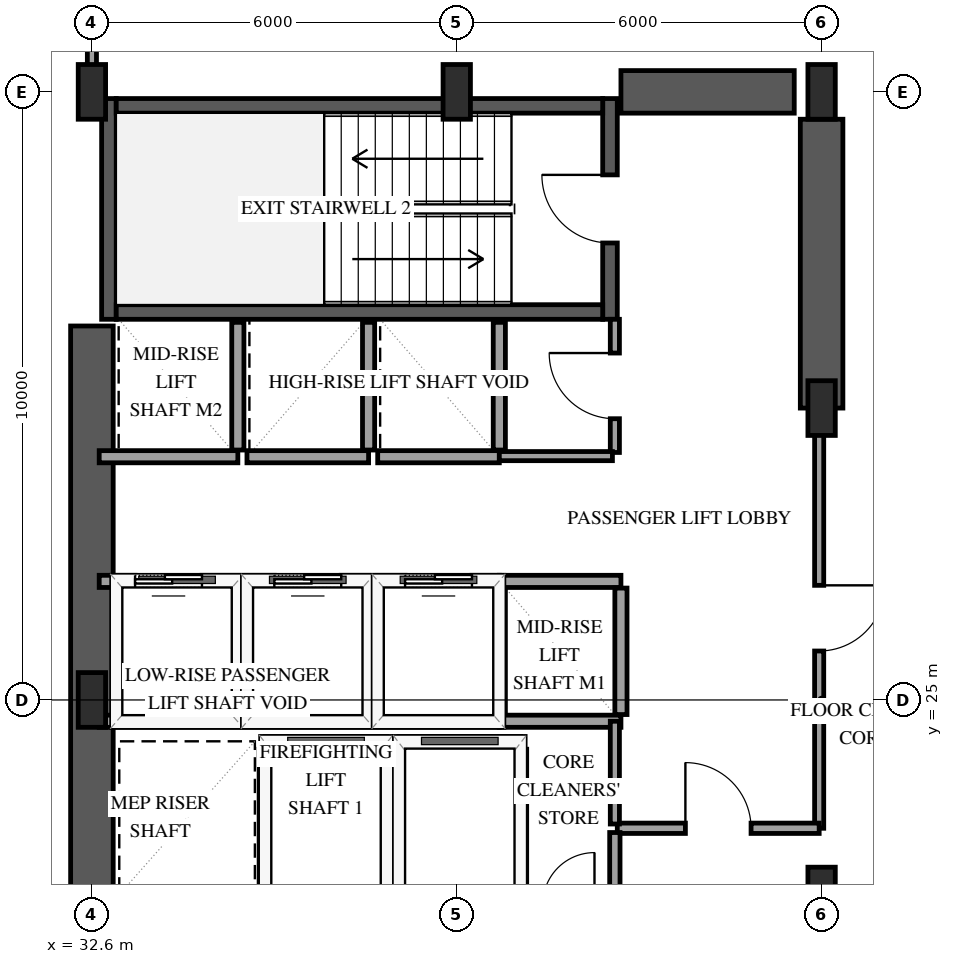
"""IFC4 building model, lengths in metres.
Left out: names, types, materials, properties, quantities, classifications, styles, units other than length and angle.
Written with IfcOpenShell. Run it as: python <this file> out.ifc"""

import sys

from ifc_helpers import new_model, si_unit, direction, frame, frame_2d, origin, origin_2d, place, context, subcontext, project, spatial, rectangle, extrude, element, fill, save


model = new_model("IFC4")
c1 = context("Model", 3, precision=1e-05, world=origin(), true_north=direction((0.0, 1.0)))
c2 = subcontext(c1, "Body", "Model", "MODEL_VIEW")
j1 = project(units=[si_unit("LENGTHUNIT", "METRE"), si_unit("PLANEANGLEUNIT", "RADIAN")], contexts=[c1])
p1 = place(None, origin())
s1 = spatial("IfcSite", under=j1, at=p1, CompositionType="ELEMENT")
p2 = place(p1, origin())
s2 = spatial("IfcBuilding", under=s1, at=p2, CompositionType="ELEMENT")
p3 = place(p2, frame((0.0, 0.0, 58.6)))
s3 = spatial("IfcBuildingStorey", under=s2, at=p3, CompositionType="ELEMENT", Elevation=58.6)
p4 = place(p3, frame((32.88, 31.26, 0.0), z_axis=(0.0, 0.0, 1.0), x_axis=(0.0, 1.0, 0.0)))
e1 = element("IfcWall", 1, at=p4, inside=s3, PredefinedType="SHEAR", context=c2, shape_type="SweptSolid", body=[
    extrude(rectangle(XDim=3.63, YDim=0.24, at=frame_2d((1.815, 0.0))), origin(), (0.0, 0.0, 1.0), 4.0),
])
p5 = place(p3, frame((41.12, 31.26, 0.0), z_axis=(0.0, 0.0, 1.0), x_axis=(0.0, 1.0, 0.0)))
e2 = element("IfcWall", 2, at=p5, inside=s3, PredefinedType="SHEAR", context=c2, shape_type="SweptSolid", body=[
    extrude(rectangle(XDim=3.63, YDim=0.24, at=frame_2d((1.815, 0.0))), origin(), (0.0, 0.0, 1.0), 4.0),
])
p6 = place(p5, frame((1.255, 0.0, 0.0)))
e3 = element("IfcOpeningElement", 3, at=p6, cuts=e2, PredefinedType="OPENING", context=c2, shape_type="SweptSolid", body=[
    extrude(rectangle(XDim=1.12, YDim=2.15, at=frame_2d((0.56, 1.075))), frame((0.0, 0.13, 0.0), z_axis=(0.0, -1.0, 0.0), x_axis=(1.0, 0.0, 0.0)), (0.0, 0.0, 1.0), 0.26),
])
for number, where, z_axis, x_axis in (
    (4, (33.0, 31.38, 0.0), (0.0, 0.0, 1.0), (1.0, 0.0, 0.0)),
    (5, (33.0, 34.77, 0.0), (0.0, 0.0, 1.0), (1.0, 0.0, 0.0)),
):
    element("IfcWall", number, at=place(p3, frame(where, z_axis=z_axis, x_axis=x_axis)), inside=s3, PredefinedType="SHEAR", context=c2, shape_type="SweptSolid", body=[
        extrude(rectangle(XDim=8.0, YDim=0.24, at=frame_2d((4.0, 0.0))), origin(), (0.0, 0.0, 1.0), 4.0),
    ])
p7 = place(p3, frame((32.6, 18.85, 0.0), z_axis=(0.0, 0.0, 1.0), x_axis=(0.0, 1.0, 0.0)))
e6 = element("IfcWall", 6, at=p7, inside=s3, PredefinedType="SHEAR", context=c2, shape_type="SweptSolid", body=[
    extrude(rectangle(XDim=12.3, YDim=0.7, at=frame_2d((6.15, 0.0))), origin(), (0.0, 0.0, 1.0), 4.0),
])
p8 = place(p3, frame((41.3, 35.0, 0.0), z_axis=(0.0, 0.0, 1.0), x_axis=(1.0, 0.0, 0.0)))
e7 = element("IfcWall", 7, at=p8, inside=s3, PredefinedType="SHEAR", context=c2, shape_type="SweptSolid", body=[
    extrude(rectangle(XDim=2.85, YDim=0.7, at=frame_2d((1.425, 0.0))), origin(), (0.0, 0.0, 1.0), 4.0),
])
p9 = place(p3, frame((44.6, 29.8, 0.0), z_axis=(0.0, 0.0, 1.0), x_axis=(0.0, 1.0, 0.0)))
e8 = element("IfcWall", 8, at=p9, inside=s3, PredefinedType="SHEAR", context=c2, shape_type="SweptSolid", body=[
    extrude(rectangle(XDim=4.75, YDim=0.7, at=frame_2d((2.375, 0.0))), origin(), (0.0, 0.0, 1.0), 4.0),
])
for number, where, z_axis, x_axis in (
    (9, (32.6, 25.0, 0.0), (0.0, 0.0, 1.0), (1.0, 0.0, 0.0)),
    (10, (32.6, 35.0, 0.0), (0.0, 0.0, 1.0), (1.0, 0.0, 0.0)),
    (11, (38.6, 35.0, 0.0), (0.0, 0.0, 1.0), (1.0, 0.0, 0.0)),
    (12, (44.6, 21.8, 0.0), (0.0, 0.0, 1.0), (1.0, 0.0, 0.0)),
    (13, (44.6, 29.8, 0.0), (0.0, 0.0, 1.0), (1.0, 0.0, 0.0)),
    (14, (44.6, 35.0, 0.0), (0.0, 0.0, 1.0), (1.0, 0.0, 0.0)),
):
    element("IfcColumn", number, at=place(p3, frame(where, z_axis=z_axis, x_axis=x_axis)), inside=s3, PredefinedType="PILASTER", context=c2, shape_type="SweptSolid", body=[
        extrude(rectangle(XDim=0.45, YDim=0.9, at=origin_2d()), origin(), (0.0, 0.0, 1.0), 4.0),
    ])
p10 = place(p3, frame((35.45, 24.3, 0.0), z_axis=(0.0, 0.0, 1.0), x_axis=(1.0, 0.0, 0.0)))
e15 = element("IfcWall", 15, at=p10, inside=s3, PredefinedType="SOLIDWALL", context=c2, shape_type="SweptSolid", body=[
    extrude(rectangle(XDim=2.0, YDim=0.2, at=frame_2d((1.0, 0.0))), origin(), (0.0, 0.0, 1.0), 3.7),
])
for number, where, z_axis, x_axis in (
    (16, (35.45, 21.81, 0.0), (0.0, 0.0, 1.0), (0.0, 1.0, 0.0)),
    (17, (37.45, 21.81, 0.0), (0.0, 0.0, 1.0), (0.0, 1.0, 0.0)),
):
    element("IfcWall", number, at=place(p3, frame(where, z_axis=z_axis, x_axis=x_axis)), inside=s3, PredefinedType="SOLIDWALL", context=c2, shape_type="SweptSolid", body=[
        extrude(rectangle(XDim=2.38, YDim=0.2, at=frame_2d((1.19, 0.0))), origin(), (0.0, 0.0, 1.0), 3.7),
    ])
p11 = place(p3, frame((37.65, 24.3, 0.0), z_axis=(0.0, 0.0, 1.0), x_axis=(1.0, 0.0, 0.0)))
e18 = element("IfcWall", 18, at=p11, inside=s3, PredefinedType="SOLIDWALL", context=c2, shape_type="SweptSolid", body=[
    extrude(rectangle(XDim=2.0, YDim=0.2, at=frame_2d((1.0, 0.0))), origin(), (0.0, 0.0, 1.0), 3.7),
])
p12 = place(p3, frame((39.65, 21.81, 0.0), z_axis=(0.0, 0.0, 1.0), x_axis=(0.0, 1.0, 0.0)))
e19 = element("IfcWall", 19, at=p12, inside=s3, PredefinedType="SOLIDWALL", context=c2, shape_type="SweptSolid", body=[
    extrude(rectangle(XDim=2.38, YDim=0.2, at=frame_2d((1.19, 0.0))), origin(), (0.0, 0.0, 1.0), 3.7),
])
p13 = place(p3, frame((32.72, 24.65, 0.0), z_axis=(0.0, 0.0, 1.0), x_axis=(1.0, 0.0, 0.0)))
e20 = element("IfcWall", 20, at=p13, inside=s3, PredefinedType="SOLIDWALL", context=c2, shape_type="SweptSolid", body=[
    extrude(rectangle(XDim=2.28, YDim=0.2, at=frame_2d((1.14, 0.0))), origin(), (0.0, 0.0, 1.0), 3.7),
])
p14 = place(p3, frame((32.72, 26.95, 0.0), z_axis=(0.0, 0.0, 1.0), x_axis=(1.0, 0.0, 0.0)))
e21 = element("IfcWall", 21, at=p14, inside=s3, PredefinedType="SOLIDWALL", context=c2, shape_type="SweptSolid", body=[
    extrude(rectangle(XDim=2.28, YDim=0.2, at=frame_2d((1.14, 0.0))), origin(), (0.0, 0.0, 1.0), 3.7),
])
p15 = place(p14, frame((0.59, 0.0, 0.0)))
e22 = element("IfcOpeningElement", 22, at=p15, cuts=e21, PredefinedType="OPENING", context=c2, shape_type="SweptSolid", body=[
    extrude(rectangle(XDim=1.1, YDim=2.15, at=frame_2d((0.55, 1.075))), frame((0.0, 0.11, 0.0), z_axis=(0.0, -1.0, 0.0), x_axis=(1.0, 0.0, 0.0)), (0.0, 0.0, 1.0), 0.22),
])
p16 = place(p3, frame((35.0, 24.76, 0.0), z_axis=(0.0, 0.0, 1.0), x_axis=(0.0, 1.0, 0.0)))
e23 = element("IfcWall", 23, at=p16, inside=s3, PredefinedType="SOLIDWALL", context=c2, shape_type="SweptSolid", body=[
    extrude(rectangle(XDim=2.08, YDim=0.2, at=frame_2d((1.04, 0.0))), origin(), (0.0, 0.0, 1.0), 3.7),
])
p17 = place(p3, frame((35.15, 24.65, 0.0), z_axis=(0.0, 0.0, 1.0), x_axis=(1.0, 0.0, 0.0)))
e24 = element("IfcWall", 24, at=p17, inside=s3, PredefinedType="SOLIDWALL", context=c2, shape_type="SweptSolid", body=[
    extrude(rectangle(XDim=2.0, YDim=0.2, at=frame_2d((1.0, 0.0))), origin(), (0.0, 0.0, 1.0), 3.7),
])
p18 = place(p3, frame((35.15, 26.95, 0.0), z_axis=(0.0, 0.0, 1.0), x_axis=(1.0, 0.0, 0.0)))
e25 = element("IfcWall", 25, at=p18, inside=s3, PredefinedType="SOLIDWALL", context=c2, shape_type="SweptSolid", body=[
    extrude(rectangle(XDim=2.0, YDim=0.2, at=frame_2d((1.0, 0.0))), origin(), (0.0, 0.0, 1.0), 3.7),
])
p19 = place(p18, frame((0.45, 0.0, 0.0)))
e26 = element("IfcOpeningElement", 26, at=p19, cuts=e25, PredefinedType="OPENING", context=c2, shape_type="SweptSolid", body=[
    extrude(rectangle(XDim=1.1, YDim=2.15, at=frame_2d((0.55, 1.075))), frame((0.0, 0.11, 0.0), z_axis=(0.0, -1.0, 0.0), x_axis=(1.0, 0.0, 0.0)), (0.0, 0.0, 1.0), 0.22),
])
p20 = place(p3, frame((37.15, 24.76, 0.0), z_axis=(0.0, 0.0, 1.0), x_axis=(0.0, 1.0, 0.0)))
e27 = element("IfcWall", 27, at=p20, inside=s3, PredefinedType="SOLIDWALL", context=c2, shape_type="SweptSolid", body=[
    extrude(rectangle(XDim=2.08, YDim=0.2, at=frame_2d((1.04, 0.0))), origin(), (0.0, 0.0, 1.0), 3.7),
])
p21 = place(p3, frame((37.3, 24.65, 0.0), z_axis=(0.0, 0.0, 1.0), x_axis=(1.0, 0.0, 0.0)))
e28 = element("IfcWall", 28, at=p21, inside=s3, PredefinedType="SOLIDWALL", context=c2, shape_type="SweptSolid", body=[
    extrude(rectangle(XDim=2.0, YDim=0.2, at=frame_2d((1.0, 0.0))), origin(), (0.0, 0.0, 1.0), 3.7),
])
p22 = place(p3, frame((37.3, 26.95, 0.0), z_axis=(0.0, 0.0, 1.0), x_axis=(1.0, 0.0, 0.0)))
e29 = element("IfcWall", 29, at=p22, inside=s3, PredefinedType="SOLIDWALL", context=c2, shape_type="SweptSolid", body=[
    extrude(rectangle(XDim=2.0, YDim=0.2, at=frame_2d((1.0, 0.0))), origin(), (0.0, 0.0, 1.0), 3.7),
])
p23 = place(p22, frame((0.45, 0.0, 0.0)))
e30 = element("IfcOpeningElement", 30, at=p23, cuts=e29, PredefinedType="OPENING", context=c2, shape_type="SweptSolid", body=[
    extrude(rectangle(XDim=1.1, YDim=2.15, at=frame_2d((0.55, 1.075))), frame((0.0, 0.11, 0.0), z_axis=(0.0, -1.0, 0.0), x_axis=(1.0, 0.0, 0.0)), (0.0, 0.0, 1.0), 0.22),
])
p24 = place(p3, frame((39.3, 24.76, 0.0), z_axis=(0.0, 0.0, 1.0), x_axis=(0.0, 1.0, 0.0)))
e31 = element("IfcWall", 31, at=p24, inside=s3, PredefinedType="SOLIDWALL", context=c2, shape_type="SweptSolid", body=[
    extrude(rectangle(XDim=2.08, YDim=0.2, at=frame_2d((1.04, 0.0))), origin(), (0.0, 0.0, 1.0), 3.7),
])
for number, where, z_axis, x_axis in (
    (32, (39.3, 24.65, 0.0), (0.0, 0.0, 1.0), (1.0, 0.0, 0.0)),
    (33, (39.3, 26.95, 0.0), (0.0, 0.0, 1.0), (1.0, 0.0, 0.0)),
):
    element("IfcWall", number, at=place(p3, frame(where, z_axis=z_axis, x_axis=x_axis)), inside=s3, PredefinedType="SOLIDWALL", context=c2, shape_type="SweptSolid", body=[
        extrude(rectangle(XDim=2.0, YDim=0.2, at=frame_2d((1.0, 0.0))), origin(), (0.0, 0.0, 1.0), 3.7),
    ])
p25 = place(p3, frame((41.3, 24.76, 0.0), z_axis=(0.0, 0.0, 1.0), x_axis=(0.0, 1.0, 0.0)))
e34 = element("IfcWall", 34, at=p25, inside=s3, PredefinedType="SOLIDWALL", context=c2, shape_type="SweptSolid", body=[
    extrude(rectangle(XDim=2.08, YDim=0.2, at=frame_2d((1.04, 0.0))), origin(), (0.0, 0.0, 1.0), 3.7),
])
p26 = place(p3, frame((32.72, 29.0, 0.0), z_axis=(0.0, 0.0, 1.0), x_axis=(1.0, 0.0, 0.0)))
e35 = element("IfcWall", 35, at=p26, inside=s3, PredefinedType="SOLIDWALL", context=c2, shape_type="SweptSolid", body=[
    extrude(rectangle(XDim=2.28, YDim=0.2, at=frame_2d((1.14, 0.0))), origin(), (0.0, 0.0, 1.0), 3.7),
])
p27 = place(p3, frame((35.0, 29.11, 0.0), z_axis=(0.0, 0.0, 1.0), x_axis=(0.0, 1.0, 0.0)))
e36 = element("IfcWall", 36, at=p27, inside=s3, PredefinedType="SOLIDWALL", context=c2, shape_type="SweptSolid", body=[
    extrude(rectangle(XDim=2.1, YDim=0.2, at=frame_2d((1.05, 0.0))), origin(), (0.0, 0.0, 1.0), 3.7),
])
p28 = place(p3, frame((35.15, 29.0, 0.0), z_axis=(0.0, 0.0, 1.0), x_axis=(1.0, 0.0, 0.0)))
e37 = element("IfcWall", 37, at=p28, inside=s3, PredefinedType="SOLIDWALL", context=c2, shape_type="SweptSolid", body=[
    extrude(rectangle(XDim=2.0, YDim=0.2, at=frame_2d((1.0, 0.0))), origin(), (0.0, 0.0, 1.0), 3.7),
])
p29 = place(p3, frame((37.15, 29.11, 0.0), z_axis=(0.0, 0.0, 1.0), x_axis=(0.0, 1.0, 0.0)))
e38 = element("IfcWall", 38, at=p29, inside=s3, PredefinedType="SOLIDWALL", context=c2, shape_type="SweptSolid", body=[
    extrude(rectangle(XDim=2.1, YDim=0.2, at=frame_2d((1.05, 0.0))), origin(), (0.0, 0.0, 1.0), 3.7),
])
p30 = place(p3, frame((37.3, 29.0, 0.0), z_axis=(0.0, 0.0, 1.0), x_axis=(1.0, 0.0, 0.0)))
e39 = element("IfcWall", 39, at=p30, inside=s3, PredefinedType="SOLIDWALL", context=c2, shape_type="SweptSolid", body=[
    extrude(rectangle(XDim=2.0, YDim=0.2, at=frame_2d((1.0, 0.0))), origin(), (0.0, 0.0, 1.0), 3.7),
])
p31 = place(p3, frame((39.3, 29.11, 0.0), z_axis=(0.0, 0.0, 1.0), x_axis=(0.0, 1.0, 0.0)))
e40 = element("IfcWall", 40, at=p31, inside=s3, PredefinedType="SOLIDWALL", context=c2, shape_type="SweptSolid", body=[
    extrude(rectangle(XDim=2.1, YDim=0.2, at=frame_2d((1.05, 0.0))), origin(), (0.0, 0.0, 1.0), 3.7),
])
p32 = place(p3, frame((44.56, 29.8, 0.0), z_axis=(0.0, 0.0, 1.0), x_axis=(0.0, -1.0, 0.0)))
e41 = element("IfcWall", 41, at=p32, inside=s3, PredefinedType="PARTITIONING", context=c2, shape_type="SweptSolid", body=[
    extrude(rectangle(XDim=6.91, YDim=0.15, at=frame_2d((3.455, 0.0))), origin(), (0.0, 0.0, 1.0), 2.74),
])
p33 = place(p32, frame((2.915, 0.0, 0.0)))
e42 = element("IfcOpeningElement", 42, at=p33, cuts=e41, PredefinedType="OPENING", context=c2, shape_type="SweptSolid", body=[
    extrude(rectangle(XDim=1.08, YDim=2.15, at=frame_2d((0.54, 1.075))), frame((0.0, 0.085, 0.0), z_axis=(0.0, -1.0, 0.0), x_axis=(1.0, 0.0, 0.0)), (0.0, 0.0, 1.0), 0.17),
])
p34 = place(p3, frame((41.24, 22.89, 0.0), z_axis=(0.0, 0.0, 1.0), x_axis=(1.0, 0.0, 0.0)))
e43 = element("IfcWall", 43, at=p34, inside=s3, PredefinedType="PARTITIONING", context=c2, shape_type="SweptSolid", body=[
    extrude(rectangle(XDim=3.32, YDim=0.17, at=frame_2d((1.66, 0.0))), origin(), (0.0, 0.0, 1.0), 3.7),
])
p35 = place(p34, frame((1.12, 0.0, 0.0)))
e44 = element("IfcOpeningElement", 44, at=p35, cuts=e43, PredefinedType="OPENING", context=c2, shape_type="SweptSolid", body=[
    extrude(rectangle(XDim=1.08, YDim=2.15, at=frame_2d((0.54, 1.075))), frame((0.0, 0.095, 0.0), z_axis=(0.0, -1.0, 0.0), x_axis=(1.0, 0.0, 0.0)), (0.0, 0.0, 1.0), 0.19),
])
p36 = place(p3, frame((41.2, 29.07, 0.0), z_axis=(0.0, 0.0, 1.0), x_axis=(0.0, 1.0, 0.0)))
e45 = element("IfcWall", 45, at=p36, inside=s3, PredefinedType="PARTITIONING", context=c2, shape_type="SweptSolid", body=[
    extrude(rectangle(XDim=2.19, YDim=0.15, at=frame_2d((1.095, 0.0))), origin(), (0.0, 0.0, 1.0), 3.7),
])
p37 = place(p36, frame((0.555, 0.0, 0.0)))
e46 = element("IfcOpeningElement", 46, at=p37, cuts=e45, PredefinedType="OPENING", context=c2, shape_type="SweptSolid", body=[
    extrude(rectangle(XDim=1.08, YDim=2.15, at=frame_2d((0.54, 1.075))), frame((0.0, 0.085, 0.0), z_axis=(0.0, -1.0, 0.0), x_axis=(1.0, 0.0, 0.0)), (0.0, 0.0, 1.0), 0.17),
])
p38 = place(p3, frame((32.6, 35.07, 0.0), z_axis=(0.0, 0.0, 1.0), x_axis=(0.0, 1.0, 0.0)))
e47 = element("IfcWall", 47, at=p38, inside=s3, PredefinedType="PARTITIONING", context=c2, shape_type="SweptSolid", body=[
    extrude(rectangle(XDim=1.91, YDim=0.15, at=frame_2d((0.955, 0.0))), origin(), (0.0, 0.0, 1.0), 3.7),
])
p39 = place(p3, frame((39.3, 29.01, 0.0), z_axis=(0.0, 0.0, 1.0), x_axis=(1.0, 0.0, 0.0)))
e48 = element("IfcWall", 48, at=p39, inside=s3, PredefinedType="PARTITIONING", context=c2, shape_type="SweptSolid", body=[
    extrude(rectangle(XDim=1.86, YDim=0.15, at=frame_2d((0.93, 0.0))), origin(), (0.0, 0.0, 1.0), 3.7),
])
p40 = place(p3, frame((41.2, 22.96, 0.0), z_axis=(0.0, 0.0, 1.0), x_axis=(0.0, 1.0, 0.0)))
e49 = element("IfcWall", 49, at=p40, inside=s3, PredefinedType="PARTITIONING", context=c2, shape_type="SweptSolid", body=[
    extrude(rectangle(XDim=1.69, YDim=0.15, at=frame_2d((0.845, 0.0))), origin(), (0.0, 0.0, 1.0), 3.7),
])
p41 = place(p3, frame((41.2, 21.7, 0.0), z_axis=(0.0, 0.0, 1.0), x_axis=(0.0, 1.0, 0.0)))
e50 = element("IfcWall", 50, at=p41, inside=s3, PredefinedType="PARTITIONING", context=c2, shape_type="SweptSolid", body=[
    extrude(rectangle(XDim=1.12, YDim=0.17, at=frame_2d((0.56, 0.0))), origin(), (0.0, 0.0, 1.0), 3.7),
])
p42 = place(p15, origin())
e51 = element("IfcDoor", 51, at=p42, inside=s3, OperationType="SLIDING_TO_LEFT", PredefinedType="DOOR", context=c2, shape_type="SweptSolid", body=[
    extrude(rectangle(XDim=1.1, YDim=2.15, at=frame_2d((0.55, 1.075))), frame((0.0, 0.025, 0.0), z_axis=(0.0, -1.0, 0.0), x_axis=(1.0, 0.0, 0.0)), (0.0, 0.0, 1.0), 0.05),
])
fill(e22, e51)
p43 = place(p19, origin())
e52 = element("IfcDoor", 52, at=p43, inside=s3, OperationType="SLIDING_TO_LEFT", PredefinedType="DOOR", context=c2, shape_type="SweptSolid", body=[
    extrude(rectangle(XDim=1.1, YDim=2.15, at=frame_2d((0.55, 1.075))), frame((0.0, 0.025, 0.0), z_axis=(0.0, -1.0, 0.0), x_axis=(1.0, 0.0, 0.0)), (0.0, 0.0, 1.0), 0.05),
])
fill(e26, e52)
p44 = place(p23, origin())
e53 = element("IfcDoor", 53, at=p44, inside=s3, OperationType="SLIDING_TO_LEFT", PredefinedType="DOOR", context=c2, shape_type="SweptSolid", body=[
    extrude(rectangle(XDim=1.1, YDim=2.15, at=frame_2d((0.55, 1.075))), frame((0.0, 0.025, 0.0), z_axis=(0.0, -1.0, 0.0), x_axis=(1.0, 0.0, 0.0)), (0.0, 0.0, 1.0), 0.05),
])
fill(e30, e53)
p45 = place(p6, origin())
e54 = element("IfcDoor", 54, at=p45, inside=s3, OperationType="SINGLE_SWING_RIGHT", PredefinedType="DOOR", context=c2, shape_type="SweptSolid", body=[
    extrude(rectangle(XDim=1.12, YDim=2.15, at=frame_2d((0.56, 1.075))), frame((0.0, 0.025, 0.0), z_axis=(0.0, -1.0, 0.0), x_axis=(1.0, 0.0, 0.0)), (0.0, 0.0, 1.0), 0.05),
])
fill(e3, e54)
p46 = place(p33, origin())
e55 = element("IfcDoor", 55, at=p46, inside=s3, OperationType="SINGLE_SWING_LEFT", PredefinedType="DOOR", context=c2, shape_type="SweptSolid", body=[
    extrude(rectangle(XDim=1.08, YDim=2.15, at=frame_2d((0.54, 1.075))), frame((0.0, 0.025, 0.0), z_axis=(0.0, -1.0, 0.0), x_axis=(1.0, 0.0, 0.0)), (0.0, 0.0, 1.0), 0.05),
])
fill(e42, e55)
p47 = place(p35, origin())
e56 = element("IfcDoor", 56, at=p47, inside=s3, OperationType="SINGLE_SWING_LEFT", PredefinedType="DOOR", context=c2, shape_type="SweptSolid", body=[
    extrude(rectangle(XDim=1.08, YDim=2.15, at=frame_2d((0.54, 1.075))), frame((0.0, 0.025, 0.0), z_axis=(0.0, -1.0, 0.0), x_axis=(1.0, 0.0, 0.0)), (0.0, 0.0, 1.0), 0.05),
])
fill(e44, e56)
p48 = place(p37, origin())
e57 = element("IfcDoor", 57, at=p48, inside=s3, OperationType="SINGLE_SWING_RIGHT", PredefinedType="DOOR", context=c2, shape_type="SweptSolid", body=[
    extrude(rectangle(XDim=1.08, YDim=2.15, at=frame_2d((0.54, 1.075))), frame((0.0, 0.025, 0.0), z_axis=(0.0, -1.0, 0.0), x_axis=(1.0, 0.0, 0.0)), (0.0, 0.0, 1.0), 0.05),
])
fill(e46, e57)
save(model, sys.argv[1])
